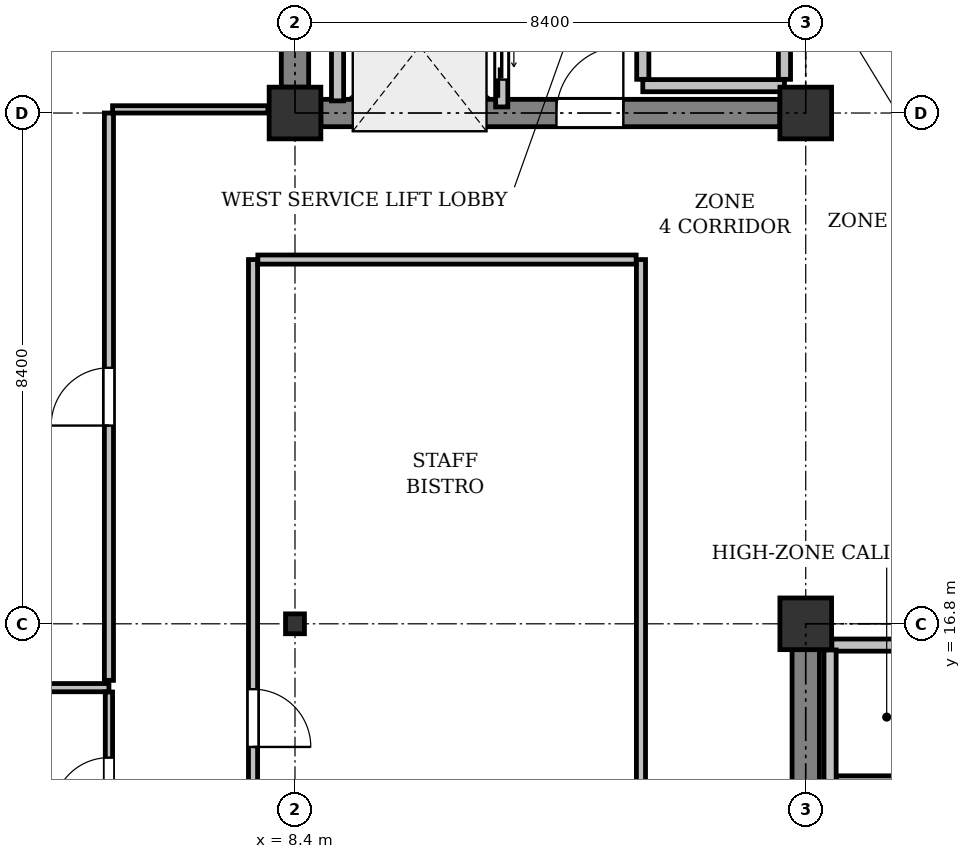
"""IFC4 building model, lengths in metres.
Left out: names, types, materials, properties, quantities, classifications, styles, units other than length and angle.
Written with IfcOpenShell. Run it as: python <this file> out.ifc"""

import sys

from ifc_helpers import new_model, si_unit, direction, frame, frame_2d, origin, origin_2d, place, context, subcontext, project, spatial, rectangle, i_section, extrude, element, fill, save


model = new_model("IFC4")
c1 = context("Model", 3, precision=1e-05, world=origin(), true_north=direction((0.0, 1.0)))
c2 = subcontext(c1, "Body", "Model", "MODEL_VIEW")
j1 = project(units=[si_unit("LENGTHUNIT", "METRE"), si_unit("PLANEANGLEUNIT", "RADIAN")], contexts=[c1])
p1 = place(None, origin())
s1 = spatial("IfcSite", under=j1, at=p1, CompositionType="ELEMENT")
p2 = place(p1, origin())
s2 = spatial("IfcBuilding", under=s1, at=p2, CompositionType="ELEMENT")
p3 = place(p2, frame((0.0, 0.0, 274.2)))
s3 = spatial("IfcBuildingStorey", under=s2, at=p3, CompositionType="ELEMENT", Elevation=274.2)
p4 = place(p3, frame((8.4, 16.8, 0.0), z_axis=(0.0, 0.0, 1.0), x_axis=(1.0, 0.0, 0.0)))
e1 = element("IfcColumn", 1, at=p4, inside=s3, PredefinedType="COLUMN", context=c2, shape_type="SweptSolid", body=[
    extrude(i_section(OverallWidth=0.311, OverallDepth=0.327, WebThickness=0.016, FlangeThickness=0.025, FilletRadius=0.017, at=origin_2d()), origin(), (0.0, 0.0, 1.0), 4.0),
])
for number, where, z_axis, x_axis in (
    (2, (8.4, 25.2, 0.0), (0.0, 0.0, 1.0), (1.0, 0.0, 0.0)),
    (3, (16.8, 16.8, 0.0), (0.0, 0.0, 1.0), (1.0, 0.0, 0.0)),
    (4, (16.8, 25.2, 0.0), (0.0, 0.0, 1.0), (1.0, 0.0, 0.0)),
):
    element("IfcColumn", number, at=place(p3, frame(where, z_axis=z_axis, x_axis=x_axis)), inside=s3, PredefinedType="COLUMN", context=c2, shape_type="SweptSolid", body=[
        extrude(rectangle(XDim=0.85, YDim=0.85, at=origin_2d()), origin(), (0.0, 0.0, 1.0), 4.0),
    ])
p5 = place(p3, frame((8.4, 25.625, 0.0), z_axis=(0.0, 0.0, 1.0), x_axis=(0.0, 1.0, 0.0)))
e5 = element("IfcWall", 5, at=p5, inside=s3, PredefinedType="SHEAR", context=c2, shape_type="SweptSolid", body=[
    extrude(rectangle(XDim=7.55, YDim=0.45, at=frame_2d((3.775, 0.0))), origin(), (0.0, 0.0, 1.0), 3.725),
])
p6 = place(p3, frame((8.825, 25.2, 0.0), z_axis=(0.0, 0.0, 1.0), x_axis=(1.0, 0.0, 0.0)))
e6 = element("IfcWall", 6, at=p6, inside=s3, PredefinedType="SHEAR", context=c2, shape_type="SweptSolid", body=[
    extrude(rectangle(XDim=7.55, YDim=0.45, at=frame_2d((3.775, 0.0))), origin(), (0.0, 0.0, 1.0), 3.725),
])
p7 = place(p6, frame((3.875, 0.0, 0.0)))
e7 = element("IfcOpeningElement", 7, at=p7, cuts=e6, PredefinedType="OPENING", context=c2, shape_type="SweptSolid", body=[
    extrude(rectangle(XDim=1.1, YDim=2.15, at=frame_2d((0.55, 1.075))), frame((0.0, 0.235, 0.0), z_axis=(0.0, -1.0, 0.0), x_axis=(1.0, 0.0, 0.0)), (0.0, 0.0, 1.0), 0.47),
])
p8 = place(p3, frame((16.8, 8.825, 0.0), z_axis=(0.0, 0.0, 1.0), x_axis=(0.0, 1.0, 0.0)))
e8 = element("IfcWall", 8, at=p8, inside=s3, PredefinedType="SHEAR", context=c2, shape_type="SweptSolid", body=[
    extrude(rectangle(XDim=7.55, YDim=0.45, at=frame_2d((3.775, 0.0))), origin(), (0.0, 0.0, 1.0), 3.725),
])
p9 = place(p8, frame((3.425, 0.0, 0.0)))
e9 = element("IfcOpeningElement", 9, at=p9, cuts=e8, PredefinedType="OPENING", context=c2, shape_type="SweptSolid", body=[
    extrude(rectangle(XDim=1.1, YDim=2.15, at=frame_2d((0.55, 1.075))), frame((0.0, 0.235, 0.0), z_axis=(0.0, -1.0, 0.0), x_axis=(1.0, 0.0, 0.0)), (0.0, 0.0, 1.0), 0.47),
])
p10 = place(p3, frame((11.8, 25.3, 0.0), z_axis=(0.0, 0.0, 1.0), x_axis=(0.0, 1.0, 0.0)))
e10 = element("IfcWall", 10, at=p10, inside=s3, PredefinedType="PARTITIONING", context=c2, shape_type="SweptSolid", body=[
    extrude(rectangle(XDim=2.0, YDim=0.2, at=frame_2d((1.0, 0.0))), origin(), (0.0, 0.0, 1.0), 3.725),
])
p11 = place(p10, frame((0.45, 0.0, 0.0)))
e11 = element("IfcOpeningElement", 11, at=p11, cuts=e10, PredefinedType="OPENING", context=c2, shape_type="SweptSolid", body=[
    extrude(rectangle(XDim=1.1, YDim=2.2, at=frame_2d((0.55, 1.1))), frame((0.0, 0.11, 0.0), z_axis=(0.0, -1.0, 0.0), x_axis=(1.0, 0.0, 0.0)), (0.0, 0.0, 1.0), 0.22),
])
p12 = place(p3, frame((9.1, 25.4, 0.0), z_axis=(0.0, 0.0, 1.0), x_axis=(0.0, 1.0, 0.0)))
e12 = element("IfcWall", 12, at=p12, inside=s3, PredefinedType="PARTITIONING", context=c2, shape_type="SweptSolid", body=[
    extrude(rectangle(XDim=1.8, YDim=0.2, at=frame_2d((0.9, 0.0))), origin(), (0.0, 0.0, 1.0), 3.725),
])
p13 = place(p3, frame((14.12, 25.65, 0.0), z_axis=(0.0, 0.0, 1.0), x_axis=(1.0, 0.0, 0.0)))
e13 = element("IfcWall", 13, at=p13, inside=s3, PredefinedType="PARTITIONING", context=c2, shape_type="SweptSolid", body=[
    extrude(rectangle(XDim=2.33, YDim=0.2, at=frame_2d((1.165, 0.0))), origin(), (0.0, 0.0, 1.0), 3.725),
])
p14 = place(p3, frame((16.45, 25.754, 0.0), z_axis=(0.0, 0.0, 1.0), x_axis=(0.0, 1.0, 0.0)))
e14 = element("IfcWall", 14, at=p14, inside=s3, PredefinedType="PARTITIONING", context=c2, shape_type="SweptSolid", body=[
    extrude(rectangle(XDim=7.416, YDim=0.2, at=frame_2d((3.708, 0.0))), origin(), (0.0, 0.0, 1.0), 3.725),
])
p15 = place(p3, frame((14.12, 31.4, 0.0), z_axis=(0.0, 0.0, 1.0), x_axis=(0.0, -1.0, 0.0)))
e15 = element("IfcWall", 15, at=p15, inside=s3, PredefinedType="PARTITIONING", context=c2, shape_type="SweptSolid", body=[
    extrude(rectangle(XDim=5.646, YDim=0.2, at=frame_2d((2.823, 0.0))), origin(), (0.0, 0.0, 1.0), 3.725),
])
p16 = place(p15, frame((2.398, 0.0, 0.0)))
e16 = element("IfcOpeningElement", 16, at=p16, cuts=e15, PredefinedType="OPENING", context=c2, shape_type="SweptSolid", body=[
    extrude(rectangle(XDim=0.85, YDim=2.15, at=frame_2d((0.425, 1.075))), frame((0.0, 0.11, 0.0), z_axis=(0.0, -1.0, 0.0), x_axis=(1.0, 0.0, 0.0)), (0.0, 0.0, 1.0), 0.22),
])
p17 = place(p3, frame((21.446, 16.45, 0.0), z_axis=(0.0, 0.0, 1.0), x_axis=(-1.0, 0.0, 0.0)))
e17 = element("IfcWall", 17, at=p17, inside=s3, PredefinedType="PARTITIONING", context=c2, shape_type="SweptSolid", body=[
    extrude(rectangle(XDim=4.216, YDim=0.2, at=frame_2d((2.108, 0.0))), origin(), (0.0, 0.0, 1.0), 3.725),
])
p18 = place(p3, frame((17.2, 16.37, 0.0), z_axis=(0.0, 0.0, 1.0), x_axis=(0.0, -1.0, 0.0)))
e18 = element("IfcWall", 18, at=p18, inside=s3, PredefinedType="PARTITIONING", context=c2, shape_type="SweptSolid", body=[
    extrude(rectangle(XDim=2.17, YDim=0.2, at=frame_2d((1.085, 0.0))), origin(), (0.0, 0.0, 1.0), 3.725),
])
p19 = place(p3, frame((17.304, 14.2, 0.0), z_axis=(0.0, 0.0, 1.0), x_axis=(1.0, 0.0, 0.0)))
e19 = element("IfcWall", 19, at=p19, inside=s3, PredefinedType="PARTITIONING", context=c2, shape_type="SweptSolid", body=[
    extrude(rectangle(XDim=4.142, YDim=0.2, at=frame_2d((2.071, 0.0))), origin(), (0.0, 0.0, 1.0), 3.725),
])
p20 = place(p19, frame((1.646, 0.0, 0.0)))
e20 = element("IfcOpeningElement", 20, at=p20, cuts=e19, PredefinedType="OPENING", context=c2, shape_type="SweptSolid", body=[
    extrude(rectangle(XDim=0.85, YDim=2.15, at=frame_2d((0.425, 1.075))), frame((0.0, 0.11, 0.0), z_axis=(0.0, -1.0, 0.0), x_axis=(1.0, 0.0, 0.0)), (0.0, 0.0, 1.0), 0.22),
])
p21 = place(p3, frame((5.34, 15.75, 0.0), z_axis=(0.0, 0.0, 1.0), x_axis=(-1.0, 0.0, 0.0)))
e21 = element("IfcWall", 21, at=p21, inside=s3, PredefinedType="PARTITIONING", context=c2, shape_type="SweptSolid", body=[
    extrude(rectangle(XDim=5.171, YDim=0.135, at=frame_2d((2.585, 0.0))), origin(), (0.0, 0.0, 1.0), 3.421),
])
p22 = place(p3, frame((5.34, 12.6, 0.0), z_axis=(0.0, 0.0, 1.0), x_axis=(0.0, 1.0, 0.0)))
e22 = element("IfcWall", 22, at=p22, inside=s3, PredefinedType="PARTITIONING", context=c2, shape_type="SweptSolid", body=[
    extrude(rectangle(XDim=3.078, YDim=0.12, at=frame_2d((1.539, 0.0))), origin(), (0.0, 0.0, 1.0), 3.725),
])
p23 = place(p22, frame((1.079, 0.0, 0.0)))
e23 = element("IfcOpeningElement", 23, at=p23, cuts=e22, PredefinedType="OPENING", context=c2, shape_type="SweptSolid", body=[
    extrude(rectangle(XDim=0.92, YDim=2.1, at=frame_2d((0.46, 1.05))), frame((0.0, 0.07, 0.0), z_axis=(0.0, -1.0, 0.0), x_axis=(1.0, 0.0, 0.0)), (0.0, 0.0, 1.0), 0.14),
])
p24 = place(p3, frame((7.71, 22.79, 0.0), z_axis=(0.0, 0.0, 1.0), x_axis=(0.0, -1.0, 0.0)))
e24 = element("IfcWall", 24, at=p24, inside=s3, PredefinedType="PARTITIONING", context=c2, shape_type="SweptSolid", body=[
    extrude(rectangle(XDim=15.08, YDim=0.15, at=frame_2d((7.54, 0.0))), origin(), (0.0, 0.0, 1.0), 3.271),
])
p25 = place(p24, frame((7.065, 0.0, 0.0)))
e25 = element("IfcOpeningElement", 25, at=p25, cuts=e24, PredefinedType="OPENING", context=c2, shape_type="SweptSolid", body=[
    extrude(rectangle(XDim=0.95, YDim=2.15, at=frame_2d((0.475, 1.075))), frame((0.0, 0.085, 0.0), z_axis=(0.0, -1.0, 0.0), x_axis=(1.0, 0.0, 0.0)), (0.0, 0.0, 1.0), 0.17),
])
p26 = place(p3, frame((14.09, 7.789, 0.0), z_axis=(0.0, 0.0, 1.0), x_axis=(0.0, 1.0, 0.0)))
e26 = element("IfcWall", 26, at=p26, inside=s3, PredefinedType="PARTITIONING", context=c2, shape_type="SweptSolid", body=[
    extrude(rectangle(XDim=15.001, YDim=0.15, at=frame_2d((7.5, 0.0))), origin(), (0.0, 0.0, 1.0), 3.271),
])
p27 = place(p3, frame((14.011, 22.79, 0.0), z_axis=(0.0, 0.0, 1.0), x_axis=(-1.0, 0.0, 0.0)))
e27 = element("IfcWall", 27, at=p27, inside=s3, PredefinedType="PARTITIONING", context=c2, shape_type="SweptSolid", body=[
    extrude(rectangle(XDim=6.222, YDim=0.15, at=frame_2d((3.111, 0.0))), origin(), (0.0, 0.0, 1.0), 3.319),
])
p28 = place(p3, frame((5.34, 15.87, 0.0), z_axis=(0.0, 0.0, 1.0), x_axis=(0.0, 1.0, 0.0)))
e28 = element("IfcWall", 28, at=p28, inside=s3, PredefinedType="PARTITIONING", context=c2, shape_type="SweptSolid", body=[
    extrude(rectangle(XDim=9.33, YDim=0.15, at=frame_2d((4.665, 0.0))), origin(), (0.0, 0.0, 1.0), 3.271),
])
p29 = place(p28, frame((4.19, 0.0, 0.0)))
e29 = element("IfcOpeningElement", 29, at=p29, cuts=e28, PredefinedType="OPENING", context=c2, shape_type="SweptSolid", body=[
    extrude(rectangle(XDim=0.95, YDim=2.15, at=frame_2d((0.475, 1.075))), frame((0.0, 0.085, 0.0), z_axis=(0.0, -1.0, 0.0), x_axis=(1.0, 0.0, 0.0)), (0.0, 0.0, 1.0), 0.17),
])
p30 = place(p3, frame((5.4, 25.26, 0.0), z_axis=(0.0, 0.0, 1.0), x_axis=(1.0, 0.0, 0.0)))
e30 = element("IfcWall", 30, at=p30, inside=s3, PredefinedType="PARTITIONING", context=c2, shape_type="SweptSolid", body=[
    extrude(rectangle(XDim=2.555, YDim=0.12, at=frame_2d((1.278, 0.0))), origin(), (0.0, 0.0, 1.0), 3.271),
])
p31 = place(p7, origin())
e31 = element("IfcDoor", 31, at=p31, inside=s3, OperationType="SINGLE_SWING_RIGHT", PredefinedType="DOOR", context=c2, shape_type="SweptSolid", body=[
    extrude(rectangle(XDim=1.1, YDim=2.15, at=frame_2d((0.55, 1.075))), frame((0.0, 0.025, 0.0), z_axis=(0.0, -1.0, 0.0), x_axis=(1.0, 0.0, 0.0)), (0.0, 0.0, 1.0), 0.05),
])
fill(e7, e31)
p32 = place(p11, origin())
e32 = element("IfcDoor", 32, at=p32, inside=s3, OperationType="DOUBLE_DOOR_SLIDING", PredefinedType="DOOR", context=c2, shape_type="SweptSolid", body=[
    extrude(rectangle(XDim=1.1, YDim=2.2, at=frame_2d((0.55, 1.1))), frame((0.0, 0.025, 0.0), z_axis=(0.0, -1.0, 0.0), x_axis=(1.0, 0.0, 0.0)), (0.0, 0.0, 1.0), 0.05),
])
fill(e11, e32)
p33 = place(p23, origin())
e33 = element("IfcDoor", 33, at=p33, inside=s3, OperationType="SINGLE_SWING_LEFT", PredefinedType="DOOR", context=c2, shape_type="SweptSolid", body=[
    extrude(rectangle(XDim=0.92, YDim=2.1, at=frame_2d((0.46, 1.05))), frame((0.0, 0.025, 0.0), z_axis=(0.0, -1.0, 0.0), x_axis=(1.0, 0.0, 0.0)), (0.0, 0.0, 1.0), 0.05),
])
fill(e23, e33)
p34 = place(p25, origin())
e34 = element("IfcDoor", 34, at=p34, inside=s3, OperationType="SINGLE_SWING_RIGHT", PredefinedType="DOOR", context=c2, shape_type="SweptSolid", body=[
    extrude(rectangle(XDim=0.95, YDim=2.15, at=frame_2d((0.475, 1.075))), frame((0.0, 0.025, 0.0), z_axis=(0.0, -1.0, 0.0), x_axis=(1.0, 0.0, 0.0)), (0.0, 0.0, 1.0), 0.05),
])
fill(e25, e34)
p35 = place(p29, origin())
e35 = element("IfcDoor", 35, at=p35, inside=s3, OperationType="SINGLE_SWING_LEFT", PredefinedType="DOOR", context=c2, shape_type="SweptSolid", body=[
    extrude(rectangle(XDim=0.95, YDim=2.15, at=frame_2d((0.475, 1.075))), frame((0.0, 0.025, 0.0), z_axis=(0.0, -1.0, 0.0), x_axis=(1.0, 0.0, 0.0)), (0.0, 0.0, 1.0), 0.05),
])
fill(e29, e35)
save(model, sys.argv[1])
